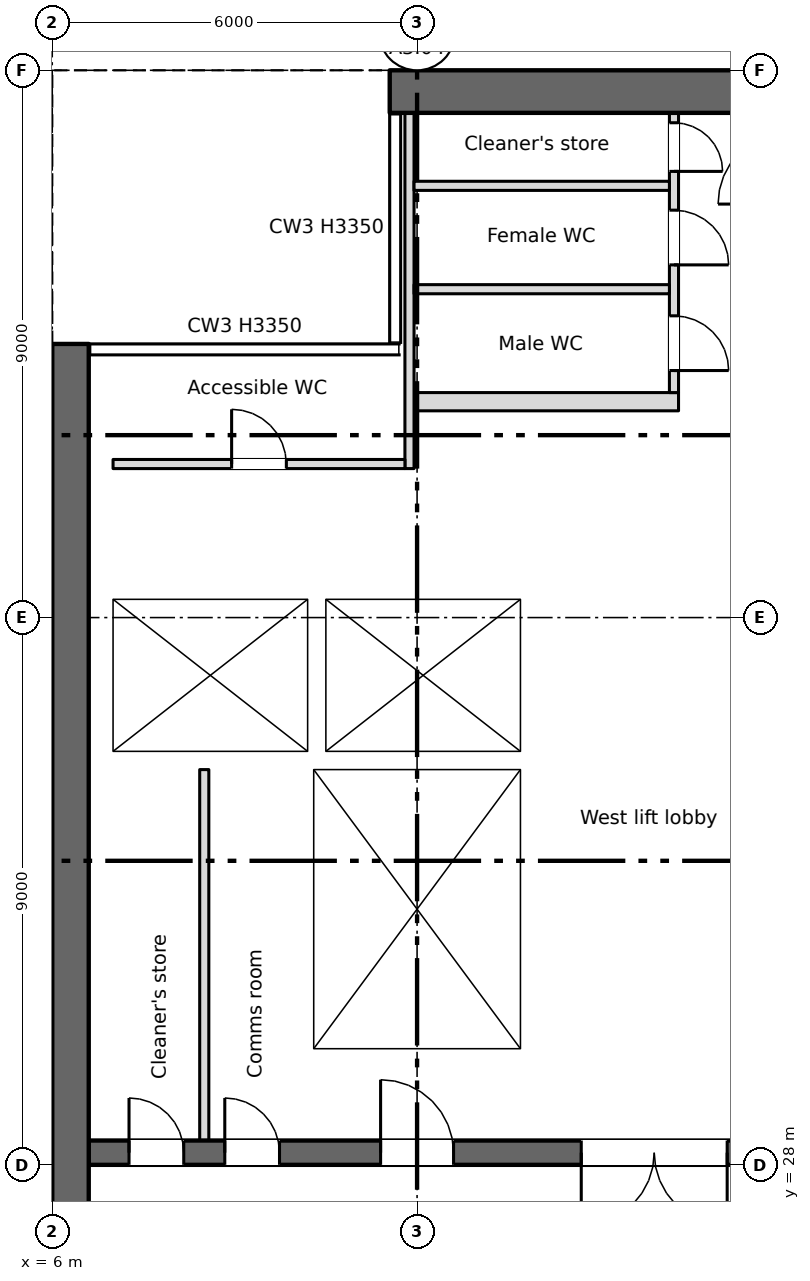
"""IFC4 building model, lengths in metres.
Left out: names, types, materials, properties, quantities, classifications, styles, units other than length and angle.
Written with IfcOpenShell. Run it as: python <this file> out.ifc"""

import sys

from ifc_helpers import new_model, si_unit, direction, frame, frame_2d, origin, place, context, subcontext, project, spatial, rectangle, extrude, element, fill, save


model = new_model("IFC4")
c1 = context("Model", 3, precision=1e-05, world=origin(), true_north=direction((0.0, 1.0)))
c2 = subcontext(c1, "Body", "Model", "MODEL_VIEW")
j1 = project(units=[si_unit("LENGTHUNIT", "METRE"), si_unit("PLANEANGLEUNIT", "RADIAN")], contexts=[c1])
p1 = place(None, origin())
s1 = spatial("IfcSite", under=j1, at=p1, CompositionType="ELEMENT")
p2 = place(p1, origin())
s2 = spatial("IfcBuilding", under=s1, at=p2, CompositionType="ELEMENT")
p3 = place(p2, frame((0.0, 0.0, 211.75)))
s3 = spatial("IfcBuildingStorey", under=s2, at=p3, CompositionType="ELEMENT", Elevation=211.75)
p4 = place(p3, frame((6.3, 7.5, 0.0), z_axis=(0.0, 0.0, 1.0), x_axis=(0.0, 1.0, 0.0)))
e1 = element("IfcWall", 1, at=p4, inside=s3, PredefinedType="SHEAR", context=c2, shape_type="SweptSolid", body=[
    extrude(rectangle(XDim=34.0, YDim=0.6, at=frame_2d((17.0, 0.0))), origin(), (0.0, 0.0, 1.0), 3.35),
])
p5 = place(p4, frame((1.2, 0.0, 0.6)))
e2 = element("IfcOpeningElement", 2, at=p5, cuts=e1, PredefinedType="OPENING", context=c2, shape_type="SweptSolid", body=[
    extrude(rectangle(XDim=0.6, YDim=2.4, at=frame_2d((0.3, 1.2))), frame((0.0, 0.31, 0.0), z_axis=(0.0, -1.0, 0.0), x_axis=(1.0, 0.0, 0.0)), (0.0, 0.0, 1.0), 0.62),
])
p6 = place(p4, frame((7.2, 0.0, 0.6)))
e3 = element("IfcOpeningElement", 3, at=p6, cuts=e1, PredefinedType="OPENING", context=c2, shape_type="SweptSolid", body=[
    extrude(rectangle(XDim=0.6, YDim=2.4, at=frame_2d((0.3, 1.2))), frame((0.0, 0.31, 0.0), z_axis=(0.0, -1.0, 0.0), x_axis=(1.0, 0.0, 0.0)), (0.0, 0.0, 1.0), 0.62),
])
p7 = place(p4, frame((13.2, 0.0, 0.6)))
e4 = element("IfcOpeningElement", 4, at=p7, cuts=e1, PredefinedType="OPENING", context=c2, shape_type="SweptSolid", body=[
    extrude(rectangle(XDim=0.6, YDim=2.4, at=frame_2d((0.3, 1.2))), frame((0.0, 0.31, 0.0), z_axis=(0.0, -1.0, 0.0), x_axis=(1.0, 0.0, 0.0)), (0.0, 0.0, 1.0), 0.62),
])
p8 = place(p4, frame((19.2, 0.0, 0.6)))
e5 = element("IfcOpeningElement", 5, at=p8, cuts=e1, PredefinedType="OPENING", context=c2, shape_type="SweptSolid", body=[
    extrude(rectangle(XDim=0.6, YDim=2.4, at=frame_2d((0.3, 1.2))), frame((0.0, 0.31, 0.0), z_axis=(0.0, -1.0, 0.0), x_axis=(1.0, 0.0, 0.0)), (0.0, 0.0, 1.0), 0.62),
])
p9 = place(p3, frame((11.55, 45.65, 0.0), z_axis=(0.0, 0.0, 1.0), x_axis=(1.0, 0.0, 0.0)))
e6 = element("IfcWall", 6, at=p9, inside=s3, PredefinedType="SHEAR", context=c2, shape_type="SweptSolid", body=[
    extrude(rectangle(XDim=54.9, YDim=0.7, at=frame_2d((27.45, 0.0))), origin(), (0.0, 0.0, 1.0), 3.35),
])
p10 = place(p3, frame((6.6, 28.2, 0.0), z_axis=(0.0, 0.0, 1.0), x_axis=(1.0, 0.0, 0.0)))
e7 = element("IfcWall", 7, at=p10, inside=s3, PredefinedType="SHEAR", context=c2, shape_type="SweptSolid", body=[
    extrude(rectangle(XDim=57.9, YDim=0.4, at=frame_2d((28.95, 0.0))), origin(), (0.0, 0.0, 1.0), 3.35),
])
p11 = place(p10, frame((12.663, 0.0, 0.0)))
e8 = element("IfcOpeningElement", 8, at=p11, cuts=e7, PredefinedType="OPENING", context=c2, shape_type="SweptSolid", body=[
    extrude(rectangle(XDim=0.9, YDim=2.1, at=frame_2d((0.45, 1.05))), frame((0.0, 0.21, 0.0), z_axis=(0.0, -1.0, 0.0), x_axis=(1.0, 0.0, 0.0)), (0.0, 0.0, 1.0), 0.42),
])
p12 = place(p10, frame((15.238, 0.0, 0.0)))
e9 = element("IfcOpeningElement", 9, at=p12, cuts=e7, PredefinedType="OPENING", context=c2, shape_type="SweptSolid", body=[
    extrude(rectangle(XDim=0.9, YDim=2.1, at=frame_2d((0.45, 1.05))), frame((0.0, 0.21, 0.0), z_axis=(0.0, -1.0, 0.0), x_axis=(1.0, 0.0, 0.0)), (0.0, 0.0, 1.0), 0.42),
])
p13 = place(p10, frame((49.95, 0.0, 0.0)))
e10 = element("IfcOpeningElement", 10, at=p13, cuts=e7, PredefinedType="OPENING", context=c2, shape_type="SweptSolid", body=[
    extrude(rectangle(XDim=0.9, YDim=2.1, at=frame_2d((0.45, 1.05))), frame((0.0, 0.21, 0.0), z_axis=(0.0, -1.0, 0.0), x_axis=(1.0, 0.0, 0.0)), (0.0, 0.0, 1.0), 0.42),
])
p14 = place(p10, frame((0.663, 0.0, 0.0)))
e11 = element("IfcOpeningElement", 11, at=p14, cuts=e7, PredefinedType="OPENING", context=c2, shape_type="SweptSolid", body=[
    extrude(rectangle(XDim=0.9, YDim=2.1, at=frame_2d((0.45, 1.05))), frame((0.0, 0.21, 0.0), z_axis=(0.0, -1.0, 0.0), x_axis=(1.0, 0.0, 0.0)), (0.0, 0.0, 1.0), 0.42),
])
p15 = place(p10, frame((2.238, 0.0, 0.0)))
e12 = element("IfcOpeningElement", 12, at=p15, cuts=e7, PredefinedType="OPENING", context=c2, shape_type="SweptSolid", body=[
    extrude(rectangle(XDim=0.9, YDim=2.1, at=frame_2d((0.45, 1.05))), frame((0.0, 0.21, 0.0), z_axis=(0.0, -1.0, 0.0), x_axis=(1.0, 0.0, 0.0)), (0.0, 0.0, 1.0), 0.42),
])
p16 = place(p10, frame((4.8, 0.0, 0.0)))
e13 = element("IfcOpeningElement", 13, at=p16, cuts=e7, PredefinedType="OPENING", context=c2, shape_type="SweptSolid", body=[
    extrude(rectangle(XDim=1.2, YDim=2.1, at=frame_2d((0.6, 1.05))), frame((0.0, 0.21, 0.0), z_axis=(0.0, -1.0, 0.0), x_axis=(1.0, 0.0, 0.0)), (0.0, 0.0, 1.0), 0.42),
])
p17 = place(p10, frame((31.8, 0.0, 0.0)))
e14 = element("IfcOpeningElement", 14, at=p17, cuts=e7, PredefinedType="OPENING", context=c2, shape_type="SweptSolid", body=[
    extrude(rectangle(XDim=1.2, YDim=2.1, at=frame_2d((0.6, 1.05))), frame((0.0, 0.21, 0.0), z_axis=(0.0, -1.0, 0.0), x_axis=(1.0, 0.0, 0.0)), (0.0, 0.0, 1.0), 0.42),
])
p18 = place(p10, frame((55.3, 0.0, 0.0)))
e15 = element("IfcOpeningElement", 15, at=p18, cuts=e7, PredefinedType="OPENING", context=c2, shape_type="SweptSolid", body=[
    extrude(rectangle(XDim=1.2, YDim=2.1, at=frame_2d((0.6, 1.05))), frame((0.0, 0.21, 0.0), z_axis=(0.0, -1.0, 0.0), x_axis=(1.0, 0.0, 0.0)), (0.0, 0.0, 1.0), 0.42),
])
p19 = place(p10, frame((21.8, 0.0, 0.0)))
e16 = element("IfcOpeningElement", 16, at=p19, cuts=e7, PredefinedType="OPENING", context=c2, shape_type="SweptSolid", body=[
    extrude(rectangle(XDim=1.2, YDim=2.1, at=frame_2d((0.6, 1.05))), frame((0.0, 0.21, 0.0), z_axis=(0.0, -1.0, 0.0), x_axis=(1.0, 0.0, 0.0)), (0.0, 0.0, 1.0), 0.42),
])
p20 = place(p10, frame((41.8, 0.0, 0.0)))
e17 = element("IfcOpeningElement", 17, at=p20, cuts=e7, PredefinedType="OPENING", context=c2, shape_type="SweptSolid", body=[
    extrude(rectangle(XDim=1.2, YDim=2.1, at=frame_2d((0.6, 1.05))), frame((0.0, 0.21, 0.0), z_axis=(0.0, -1.0, 0.0), x_axis=(1.0, 0.0, 0.0)), (0.0, 0.0, 1.0), 0.42),
])
p21 = place(p10, frame((24.95, 0.0, 0.0)))
e18 = element("IfcOpeningElement", 18, at=p21, cuts=e7, PredefinedType="OPENING", context=c2, shape_type="SweptSolid", body=[
    extrude(rectangle(XDim=2.4, YDim=2.1, at=frame_2d((1.2, 1.05))), frame((0.0, 0.21, 0.0), z_axis=(0.0, -1.0, 0.0), x_axis=(1.0, 0.0, 0.0)), (0.0, 0.0, 1.0), 0.42),
])
p22 = place(p10, frame((37.45, 0.0, 0.0)))
e19 = element("IfcOpeningElement", 19, at=p22, cuts=e7, PredefinedType="OPENING", context=c2, shape_type="SweptSolid", body=[
    extrude(rectangle(XDim=2.4, YDim=2.1, at=frame_2d((1.2, 1.05))), frame((0.0, 0.21, 0.0), z_axis=(0.0, -1.0, 0.0), x_axis=(1.0, 0.0, 0.0)), (0.0, 0.0, 1.0), 0.42),
])
p23 = place(p10, frame((8.1, 0.0, 0.0)))
e20 = element("IfcOpeningElement", 20, at=p23, cuts=e7, PredefinedType="OPENING", context=c2, shape_type="SweptSolid", body=[
    extrude(rectangle(XDim=2.4, YDim=2.1, at=frame_2d((1.2, 1.05))), frame((0.0, 0.21, 0.0), z_axis=(0.0, -1.0, 0.0), x_axis=(1.0, 0.0, 0.0)), (0.0, 0.0, 1.0), 0.42),
])
p24 = place(p10, frame((28.95, 0.0, 0.0)))
e21 = element("IfcOpeningElement", 21, at=p24, cuts=e7, PredefinedType="OPENING", context=c2, shape_type="SweptSolid", body=[
    extrude(rectangle(XDim=0.9, YDim=2.1, at=frame_2d((0.45, 1.05))), frame((0.0, 0.21, 0.0), z_axis=(0.0, -1.0, 0.0), x_axis=(1.0, 0.0, 0.0)), (0.0, 0.0, 1.0), 0.42),
])
p25 = place(p10, frame((34.95, 0.0, 0.0)))
e22 = element("IfcOpeningElement", 22, at=p25, cuts=e7, PredefinedType="OPENING", context=c2, shape_type="SweptSolid", body=[
    extrude(rectangle(XDim=0.9, YDim=2.1, at=frame_2d((0.45, 1.05))), frame((0.0, 0.21, 0.0), z_axis=(0.0, -1.0, 0.0), x_axis=(1.0, 0.0, 0.0)), (0.0, 0.0, 1.0), 0.42),
])
p26 = place(p3, frame((6.8, 28.4, 0.0), z_axis=(0.0, 0.0, 1.0), x_axis=(0.0, 1.0, 0.0)))
e23 = element("IfcWall", 23, at=p26, inside=s3, PredefinedType="SHEAR", context=c2, shape_type="SweptSolid", body=[
    extrude(rectangle(XDim=12.85, YDim=0.4, at=frame_2d((6.425, 0.0))), origin(), (0.0, 0.0, 1.0), 3.35),
])
for number, where, z_axis, x_axis in (
    (24, (10.15, 28.4, 0.0), (0.0, 0.0, 1.0), (0.0, 1.0, 0.0)),
    (25, (13.85, 28.4, 0.0), (0.0, 0.0, 1.0), (0.0, 1.0, 0.0)),
):
    element("IfcWall", number, at=place(p3, frame(where, z_axis=z_axis, x_axis=x_axis)), inside=s3, PredefinedType="SHEAR", context=c2, shape_type="SweptSolid", body=[
        extrude(rectangle(XDim=6.1, YDim=0.3, at=frame_2d((3.05, 0.0))), origin(), (0.0, 0.0, 1.0), 3.35),
    ])
for number, where, z_axis, x_axis in (
    (26, (7.0, 34.65, 0.0), (0.0, 0.0, 1.0), (1.0, 0.0, 0.0)),
    (27, (7.0, 37.45, 0.0), (0.0, 0.0, 1.0), (1.0, 0.0, 0.0)),
):
    element("IfcWall", number, at=place(p3, frame(where, z_axis=z_axis, x_axis=x_axis)), inside=s3, PredefinedType="SHEAR", context=c2, shape_type="SweptSolid", body=[
        extrude(rectangle(XDim=7.0, YDim=0.3, at=frame_2d((3.5, 0.0))), origin(), (0.0, 0.0, 1.0), 3.35),
    ])
p27 = place(p3, frame((13.85, 34.8, 0.0), z_axis=(0.0, 0.0, 1.0), x_axis=(0.0, 1.0, 0.0)))
e28 = element("IfcWall", 28, at=p27, inside=s3, PredefinedType="SHEAR", context=c2, shape_type="SweptSolid", body=[
    extrude(rectangle(XDim=2.5, YDim=0.3, at=frame_2d((1.25, 0.0))), origin(), (0.0, 0.0, 1.0), 3.35),
])
p28 = place(p3, frame((11.95, 40.55, 0.0), z_axis=(0.0, 0.0, 1.0), x_axis=(1.0, 0.0, 0.0)))
e29 = element("IfcWall", 29, at=p28, inside=s3, PredefinedType="PARTITIONING", context=c2, shape_type="SweptSolid", body=[
    extrude(rectangle(XDim=4.35, YDim=0.3, at=frame_2d((2.175, 0.0))), origin(), (0.0, 0.0, 1.0), 3.35),
])
p29 = place(p3, frame((10.35, 34.8, 0.0), z_axis=(0.0, 0.0, 1.0), x_axis=(0.0, 1.0, 0.0)))
e30 = element("IfcWall", 30, at=p29, inside=s3, PredefinedType="SHEAR", context=c2, shape_type="SweptSolid", body=[
    extrude(rectangle(XDim=2.5, YDim=0.3, at=frame_2d((1.25, 0.0))), origin(), (0.0, 0.0, 1.0), 3.35),
])
p30 = place(p3, frame((16.225, 45.3, 0.0), z_axis=(0.0, 0.0, 1.0), x_axis=(0.0, -1.0, 0.0)))
e31 = element("IfcWall", 31, at=p30, inside=s3, PredefinedType="PARTITIONING", context=c2, shape_type="SweptSolid", body=[
    extrude(rectangle(XDim=4.6, YDim=0.15, at=frame_2d((2.3, 0.0))), origin(), (0.0, 0.0, 1.0), 3.35),
])
p31 = place(p30, frame((3.337, 0.0, 0.0)))
e32 = element("IfcOpeningElement", 32, at=p31, cuts=e31, PredefinedType="OPENING", context=c2, shape_type="SweptSolid", body=[
    extrude(rectangle(XDim=0.9, YDim=2.1, at=frame_2d((0.45, 1.05))), frame((0.0, 0.085, 0.0), z_axis=(0.0, -1.0, 0.0), x_axis=(1.0, 0.0, 0.0)), (0.0, 0.0, 1.0), 0.17),
])
p32 = place(p30, frame((1.6, 0.0, 0.0)))
e33 = element("IfcOpeningElement", 33, at=p32, cuts=e31, PredefinedType="OPENING", context=c2, shape_type="SweptSolid", body=[
    extrude(rectangle(XDim=0.9, YDim=2.1, at=frame_2d((0.45, 1.05))), frame((0.0, 0.085, 0.0), z_axis=(0.0, -1.0, 0.0), x_axis=(1.0, 0.0, 0.0)), (0.0, 0.0, 1.0), 0.17),
])
p33 = place(p30, frame((0.163, 0.0, 0.0)))
e34 = element("IfcOpeningElement", 34, at=p33, cuts=e31, PredefinedType="OPENING", context=c2, shape_type="SweptSolid", body=[
    extrude(rectangle(XDim=0.8, YDim=2.1, at=frame_2d((0.4, 1.05))), frame((0.0, 0.085, 0.0), z_axis=(0.0, -1.0, 0.0), x_axis=(1.0, 0.0, 0.0)), (0.0, 0.0, 1.0), 0.17),
])
p34 = place(p3, frame((8.5, 28.4, 0.0), z_axis=(0.0, 0.0, 1.0), x_axis=(0.0, 1.0, 0.0)))
e35 = element("IfcWall", 35, at=p34, inside=s3, PredefinedType="PARTITIONING", context=c2, shape_type="SweptSolid", body=[
    extrude(rectangle(XDim=6.1, YDim=0.15, at=frame_2d((3.05, 0.0))), origin(), (0.0, 0.0, 1.0), 3.35),
])
p35 = place(p3, frame((11.875, 39.45, 0.0), z_axis=(0.0, 0.0, 1.0), x_axis=(0.0, 1.0, 0.0)))
e36 = element("IfcWall", 36, at=p35, inside=s3, PredefinedType="PARTITIONING", context=c2, shape_type="SweptSolid", body=[
    extrude(rectangle(XDim=5.85, YDim=0.15, at=frame_2d((2.925, 0.0))), origin(), (0.0, 0.0, 1.0), 3.35),
])
p36 = place(p3, frame((7.0, 39.525, 0.0), z_axis=(0.0, 0.0, 1.0), x_axis=(1.0, 0.0, 0.0)))
e37 = element("IfcWall", 37, at=p36, inside=s3, PredefinedType="PARTITIONING", context=c2, shape_type="SweptSolid", body=[
    extrude(rectangle(XDim=4.8, YDim=0.15, at=frame_2d((2.4, 0.0))), origin(), (0.0, 0.0, 1.0), 3.35),
])
p37 = place(p36, frame((1.95, 0.0, 0.0)))
e38 = element("IfcOpeningElement", 38, at=p37, cuts=e37, PredefinedType="OPENING", context=c2, shape_type="SweptSolid", body=[
    extrude(rectangle(XDim=0.9, YDim=2.1, at=frame_2d((0.45, 1.05))), frame((0.0, 0.085, 0.0), z_axis=(0.0, -1.0, 0.0), x_axis=(1.0, 0.0, 0.0)), (0.0, 0.0, 1.0), 0.17),
])
for number, where, z_axis, x_axis in (
    (39, (11.95, 42.4, 0.0), (0.0, 0.0, 1.0), (1.0, 0.0, 0.0)),
    (40, (11.95, 44.1, 0.0), (0.0, 0.0, 1.0), (1.0, 0.0, 0.0)),
):
    element("IfcWall", number, at=place(p3, frame(where, z_axis=z_axis, x_axis=x_axis)), inside=s3, PredefinedType="PARTITIONING", context=c2, shape_type="SweptSolid", body=[
        extrude(rectangle(XDim=4.2, YDim=0.15, at=frame_2d((2.1, 0.0))), origin(), (0.0, 0.0, 1.0), 3.35),
    ])
p38 = place(p14, origin())
e41 = element("IfcDoor", 41, at=p38, inside=s3, OperationType="SINGLE_SWING_LEFT", PredefinedType="DOOR", context=c2, shape_type="SweptSolid", body=[
    extrude(rectangle(XDim=0.9, YDim=2.1, at=frame_2d((0.45, 1.05))), frame((0.0, 0.025, 0.0), z_axis=(0.0, -1.0, 0.0), x_axis=(1.0, 0.0, 0.0)), (0.0, 0.0, 1.0), 0.05),
])
fill(e11, e41)
p39 = place(p15, origin())
e42 = element("IfcDoor", 42, at=p39, inside=s3, OperationType="SINGLE_SWING_LEFT", PredefinedType="DOOR", context=c2, shape_type="SweptSolid", body=[
    extrude(rectangle(XDim=0.9, YDim=2.1, at=frame_2d((0.45, 1.05))), frame((0.0, 0.025, 0.0), z_axis=(0.0, -1.0, 0.0), x_axis=(1.0, 0.0, 0.0)), (0.0, 0.0, 1.0), 0.05),
])
fill(e12, e42)
p40 = place(p37, origin())
e43 = element("IfcDoor", 43, at=p40, inside=s3, OperationType="SINGLE_SWING_LEFT", PredefinedType="DOOR", context=c2, shape_type="SweptSolid", body=[
    extrude(rectangle(XDim=0.9, YDim=2.1, at=frame_2d((0.45, 1.05))), frame((0.0, 0.025, 0.0), z_axis=(0.0, -1.0, 0.0), x_axis=(1.0, 0.0, 0.0)), (0.0, 0.0, 1.0), 0.05),
])
fill(e38, e43)
p41 = place(p31, origin())
e44 = element("IfcDoor", 44, at=p41, inside=s3, OperationType="SINGLE_SWING_RIGHT", PredefinedType="DOOR", context=c2, shape_type="SweptSolid", body=[
    extrude(rectangle(XDim=0.9, YDim=2.1, at=frame_2d((0.45, 1.05))), frame((0.0, 0.025, 0.0), z_axis=(0.0, -1.0, 0.0), x_axis=(1.0, 0.0, 0.0)), (0.0, 0.0, 1.0), 0.05),
])
fill(e32, e44)
p42 = place(p32, origin())
e45 = element("IfcDoor", 45, at=p42, inside=s3, OperationType="SINGLE_SWING_RIGHT", PredefinedType="DOOR", context=c2, shape_type="SweptSolid", body=[
    extrude(rectangle(XDim=0.9, YDim=2.1, at=frame_2d((0.45, 1.05))), frame((0.0, 0.025, 0.0), z_axis=(0.0, -1.0, 0.0), x_axis=(1.0, 0.0, 0.0)), (0.0, 0.0, 1.0), 0.05),
])
fill(e33, e45)
p43 = place(p33, origin())
e46 = element("IfcDoor", 46, at=p43, inside=s3, OperationType="SINGLE_SWING_RIGHT", PredefinedType="DOOR", context=c2, shape_type="SweptSolid", body=[
    extrude(rectangle(XDim=0.8, YDim=2.1, at=frame_2d((0.4, 1.05))), frame((0.0, 0.025, 0.0), z_axis=(0.0, -1.0, 0.0), x_axis=(1.0, 0.0, 0.0)), (0.0, 0.0, 1.0), 0.05),
])
fill(e34, e46)
p44 = place(p16, origin())
e47 = element("IfcDoor", 47, at=p44, inside=s3, OperationType="SINGLE_SWING_LEFT", PredefinedType="DOOR", context=c2, shape_type="SweptSolid", body=[
    extrude(rectangle(XDim=1.2, YDim=2.1, at=frame_2d((0.6, 1.05))), frame((0.0, 0.025, 0.0), z_axis=(0.0, -1.0, 0.0), x_axis=(1.0, 0.0, 0.0)), (0.0, 0.0, 1.0), 0.05),
])
fill(e13, e47)
p45 = place(p23, origin())
e48 = element("IfcDoor", 48, at=p45, inside=s3, OperationType="DOUBLE_DOOR_SINGLE_SWING", PredefinedType="DOOR", context=c2, shape_type="SweptSolid", body=[
    extrude(rectangle(XDim=2.4, YDim=2.1, at=frame_2d((1.2, 1.05))), frame((0.0, 0.025, 0.0), z_axis=(0.0, -1.0, 0.0), x_axis=(1.0, 0.0, 0.0)), (0.0, 0.0, 1.0), 0.05),
])
fill(e20, e48)
save(model, sys.argv[1])
